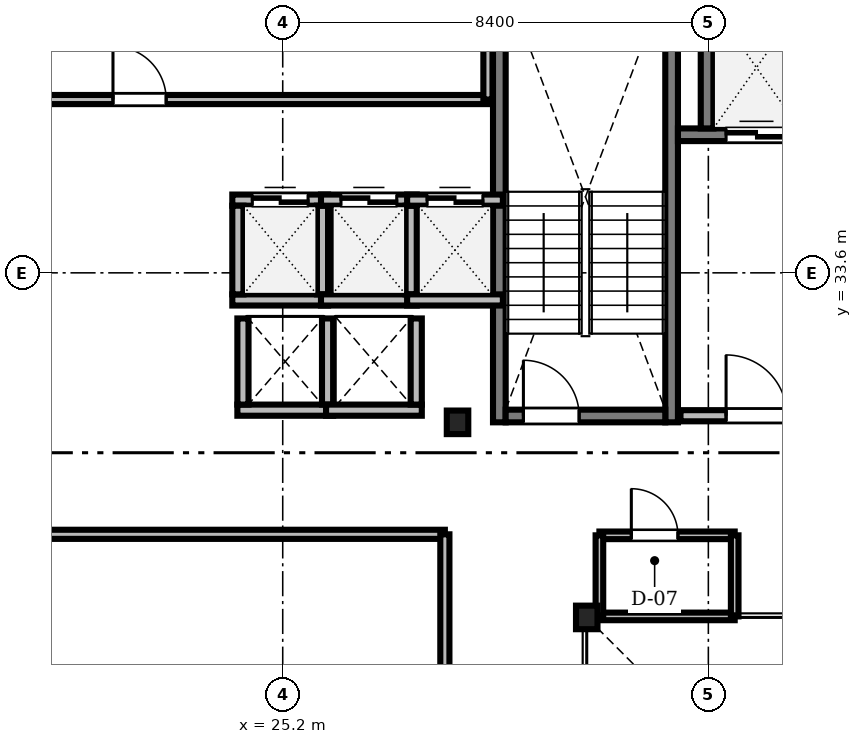
"""IFC4 building model, lengths in metres.
Left out: names, types, materials, properties, quantities, classifications, styles, units other than length and angle.
Written with IfcOpenShell. Run it as: python <this file> out.ifc"""

import sys

from ifc_helpers import new_model, si_unit, direction, frame, frame_2d, origin, origin_2d, place, context, subcontext, project, spatial, rectangle, i_section, extrude, source, transform, mapped, element, fill, save


model = new_model("IFC4")
c1 = context("Model", 3, precision=1e-05, world=origin(), true_north=direction((0.0, 1.0)))
c2 = subcontext(c1, "Body", "Model", "MODEL_VIEW")
j1 = project(units=[si_unit("LENGTHUNIT", "METRE"), si_unit("PLANEANGLEUNIT", "RADIAN")], contexts=[c1])
p1 = place(None, origin())
s1 = spatial("IfcSite", under=j1, at=p1, CompositionType="ELEMENT")
p2 = place(p1, origin())
s2 = spatial("IfcBuilding", under=s1, at=p2, CompositionType="ELEMENT")
p3 = place(p2, frame((0.0, 0.0, 155.7)))
s3 = spatial("IfcBuildingStorey", under=s2, at=p3, CompositionType="ELEMENT", Elevation=155.7)
m1 = source(origin(), c2, "Body", "SweptSolid", [
    extrude(i_section(OverallWidth=0.424, OverallDepth=0.465, WebThickness=0.035, FlangeThickness=0.056, FilletRadius=0.015, at=origin_2d()), origin(), (0.0, 0.0, 1.0), 3.46),
])
for number, where, z_axis, x_axis in (
    (1, (31.2, 26.8, 0.0), (0.0, 0.0, 1.0), (1.0, 0.0, 0.0)),
    (2, (28.65, 30.65, 0.0), (0.0, 0.0, 1.0), (1.0, 0.0, 0.0)),
):
    element("IfcColumn", number, at=place(p3, frame(where, z_axis=z_axis, x_axis=x_axis)), inside=s3, PredefinedType="COLUMN", context=c2, shape_type="MappedRepresentation", body=[
        mapped(m1, transform((0.0, 0.0, 0.0), scale=1.0)),
    ])
m2 = source(origin(), c2, "Body", "SweptSolid", [
    extrude(rectangle(XDim=9.25, YDim=0.25, at=frame_2d((4.625, 0.0))), origin(), (0.0, 0.0, 1.0), 3.5),
])
for number, where, z_axis, x_axis in (
    (3, (29.475, 30.65, 0.0), (0.0, 0.0, 1.0), (0.0, 1.0, 0.0)),
    (4, (32.875, 30.65, 0.0), (0.0, 0.0, 1.0), (0.0, 1.0, 0.0)),
):
    element("IfcWall", number, at=place(p3, frame(where, z_axis=z_axis, x_axis=x_axis)), inside=s3, PredefinedType="SOLIDWALL", context=c2, shape_type="MappedRepresentation", body=[
        mapped(m2, transform((0.0, 0.0, 0.0), scale=1.0)),
    ])
m3 = source(origin(), c2, "Body", "SweptSolid", [
    extrude(rectangle(XDim=3.15, YDim=0.25, at=frame_2d((1.575, 0.0))), origin(), (0.0, 0.0, 1.0), 3.5),
])
p4 = place(p3, frame((29.6, 30.775, 0.0), z_axis=(0.0, 0.0, 1.0), x_axis=(1.0, 0.0, 0.0)))
e5 = element("IfcWall", 5, at=p4, inside=s3, PredefinedType="SOLIDWALL", context=c2, shape_type="MappedRepresentation", body=[
    mapped(m3, transform((0.0, 0.0, 0.0), scale=1.0)),
])
m4 = source(origin(), c2, "Body", "SweptSolid", [
    extrude(rectangle(XDim=1.1, YDim=2.2, at=frame_2d((0.55, 1.1))), frame((0.0, 0.135, 0.0), z_axis=(0.0, -1.0, 0.0), x_axis=(1.0, 0.0, 0.0)), (0.0, 0.0, 1.0), 0.27),
])
p5 = place(p4, frame((0.35, 0.0, 0.0)))
e6 = element("IfcOpeningElement", 6, at=p5, cuts=e5, PredefinedType="OPENING", context=c2, shape_type="MappedRepresentation", body=[
    mapped(m4, transform((0.0, 0.0, 0.0), scale=1.0)),
])
m5 = source(origin(), c2, "Body", "SweptSolid", [
    extrude(rectangle(XDim=3.0, YDim=0.22, at=frame_2d((1.5, 0.0))), origin(), (0.0, 0.0, 1.0), 3.46),
])
p6 = place(p3, frame((33.05, 30.78, 0.0), z_axis=(0.0, 0.0, 1.0), x_axis=(1.0, 0.0, 0.0)))
e7 = element("IfcWall", 7, at=p6, inside=s3, PredefinedType="SOLIDWALL", context=c2, shape_type="MappedRepresentation", body=[
    mapped(m5, transform((0.0, 0.0, 0.0), scale=1.0)),
])
m6 = source(origin(), c2, "Body", "SweptSolid", [
    extrude(rectangle(XDim=1.2, YDim=2.2, at=frame_2d((0.6, 1.1))), frame((0.0, 0.12, 0.0), z_axis=(0.0, -1.0, 0.0), x_axis=(1.0, 0.0, 0.0)), (0.0, 0.0, 1.0), 0.24),
])
p7 = place(p6, frame((0.9, 0.0, 0.0)))
e8 = element("IfcOpeningElement", 8, at=p7, cuts=e7, PredefinedType="OPENING", context=c2, shape_type="MappedRepresentation", body=[
    mapped(m6, transform((0.0, 0.0, 0.0), scale=1.0)),
])
m7 = source(origin(), c2, "Body", "SweptSolid", [
    extrude(rectangle(XDim=1.89, YDim=0.22, at=frame_2d((0.945, 0.0))), origin(), (0.0, 0.0, 1.0), 3.46),
])
p8 = place(p3, frame((24.205, 33.065, 0.0), z_axis=(0.0, 0.0, 1.0), x_axis=(1.0, 0.0, 0.0)))
e9 = element("IfcWall", 9, at=p8, inside=s3, PredefinedType="SOLIDWALL", context=c2, shape_type="MappedRepresentation", body=[
    mapped(m7, transform((0.0, 0.0, 0.0), scale=1.0)),
])
p9 = place(p3, frame((24.205, 35.035, 0.0), z_axis=(0.0, 0.0, 1.0), x_axis=(1.0, 0.0, 0.0)))
e10 = element("IfcWall", 10, at=p9, inside=s3, PredefinedType="SOLIDWALL", context=c2, shape_type="MappedRepresentation", body=[
    mapped(m7, transform((0.0, 0.0, 0.0), scale=1.0)),
])
m8 = source(origin(), c2, "Body", "SweptSolid", [
    extrude(rectangle(XDim=1.1, YDim=2.2, at=frame_2d((0.55, 1.1))), frame((0.0, 0.12, 0.0), z_axis=(0.0, -1.0, 0.0), x_axis=(1.0, 0.0, 0.0)), (0.0, 0.0, 1.0), 0.24),
])
p10 = place(p9, frame((0.395, 0.0, 0.0)))
e11 = element("IfcOpeningElement", 11, at=p10, cuts=e10, PredefinedType="OPENING", context=c2, shape_type="MappedRepresentation", body=[
    mapped(m8, transform((0.0, 0.0, 0.0), scale=1.0)),
])
m9 = source(origin(), c2, "Body", "SweptSolid", [
    extrude(rectangle(XDim=1.75, YDim=0.22, at=frame_2d((0.875, 0.0))), origin(), (0.0, 0.0, 1.0), 3.46),
])
for number, where, z_axis, x_axis in (
    (12, (24.315, 33.175, 0.0), (0.0, 0.0, 1.0), (0.0, 1.0, 0.0)),
    (13, (25.985, 33.175, 0.0), (0.0, 0.0, 1.0), (0.0, 1.0, 0.0)),
):
    element("IfcWall", number, at=place(p3, frame(where, z_axis=z_axis, x_axis=x_axis)), inside=s3, PredefinedType="SOLIDWALL", context=c2, shape_type="MappedRepresentation", body=[
        mapped(m9, transform((0.0, 0.0, 0.0), scale=1.0)),
    ])
p11 = place(p3, frame((25.955, 33.065, 0.0), z_axis=(0.0, 0.0, 1.0), x_axis=(1.0, 0.0, 0.0)))
e14 = element("IfcWall", 14, at=p11, inside=s3, PredefinedType="SOLIDWALL", context=c2, shape_type="MappedRepresentation", body=[
    mapped(m7, transform((0.0, 0.0, 0.0), scale=1.0)),
])
p12 = place(p3, frame((25.955, 35.035, 0.0), z_axis=(0.0, 0.0, 1.0), x_axis=(1.0, 0.0, 0.0)))
e15 = element("IfcWall", 15, at=p12, inside=s3, PredefinedType="SOLIDWALL", context=c2, shape_type="MappedRepresentation", body=[
    mapped(m7, transform((0.0, 0.0, 0.0), scale=1.0)),
])
p13 = place(p12, frame((0.395, 0.0, 0.0)))
e16 = element("IfcOpeningElement", 16, at=p13, cuts=e15, PredefinedType="OPENING", context=c2, shape_type="MappedRepresentation", body=[
    mapped(m8, transform((0.0, 0.0, 0.0), scale=1.0)),
])
p14 = place(p3, frame((27.735, 33.175, 0.0), z_axis=(0.0, 0.0, 1.0), x_axis=(0.0, 1.0, 0.0)))
e17 = element("IfcWall", 17, at=p14, inside=s3, PredefinedType="SOLIDWALL", context=c2, shape_type="MappedRepresentation", body=[
    mapped(m9, transform((0.0, 0.0, 0.0), scale=1.0)),
])
p15 = place(p3, frame((27.655, 33.065, 0.0), z_axis=(0.0, 0.0, 1.0), x_axis=(1.0, 0.0, 0.0)))
e18 = element("IfcWall", 18, at=p15, inside=s3, PredefinedType="SOLIDWALL", context=c2, shape_type="MappedRepresentation", body=[
    mapped(m7, transform((0.0, 0.0, 0.0), scale=1.0)),
])
p16 = place(p3, frame((27.655, 35.035, 0.0), z_axis=(0.0, 0.0, 1.0), x_axis=(1.0, 0.0, 0.0)))
e19 = element("IfcWall", 19, at=p16, inside=s3, PredefinedType="SOLIDWALL", context=c2, shape_type="MappedRepresentation", body=[
    mapped(m7, transform((0.0, 0.0, 0.0), scale=1.0)),
])
p17 = place(p16, frame((0.395, 0.0, 0.0)))
e20 = element("IfcOpeningElement", 20, at=p17, cuts=e19, PredefinedType="OPENING", context=c2, shape_type="MappedRepresentation", body=[
    mapped(m8, transform((0.0, 0.0, 0.0), scale=1.0)),
])
m10 = source(origin(), c2, "Body", "SweptSolid", [
    extrude(rectangle(XDim=3.1, YDim=0.25, at=frame_2d((1.55, 0.0))), origin(), (0.0, 0.0, 1.0), 3.46),
])
p18 = place(p3, frame((33.0, 36.325, 0.0), z_axis=(0.0, 0.0, 1.0), x_axis=(1.0, 0.0, 0.0)))
e21 = element("IfcWall", 21, at=p18, inside=s3, PredefinedType="SOLIDWALL", context=c2, shape_type="MappedRepresentation", body=[
    mapped(m10, transform((0.0, 0.0, 0.0), scale=1.0)),
])
m11 = source(origin(), c2, "Body", "SweptSolid", [
    extrude(rectangle(XDim=1.2, YDim=2.25, at=frame_2d((0.6, 1.125))), frame((0.0, 0.135, 0.0), z_axis=(0.0, -1.0, 0.0), x_axis=(1.0, 0.0, 0.0)), (0.0, 0.0, 1.0), 0.27),
])
p19 = place(p18, frame((0.95, 0.0, 0.0)))
e22 = element("IfcOpeningElement", 22, at=p19, cuts=e21, PredefinedType="OPENING", context=c2, shape_type="MappedRepresentation", body=[
    mapped(m11, transform((0.0, 0.0, 0.0), scale=1.0)),
])
m12 = source(origin(), c2, "Body", "SweptSolid", [
    extrude(rectangle(XDim=2.4, YDim=0.25, at=frame_2d((1.2, 0.0))), origin(), (0.0, 0.0, 1.0), 3.46),
])
p20 = place(p3, frame((33.575, 36.45, 0.0), z_axis=(0.0, 0.0, 1.0), x_axis=(0.0, 1.0, 0.0)))
e23 = element("IfcWall", 23, at=p20, inside=s3, PredefinedType="SOLIDWALL", context=c2, shape_type="MappedRepresentation", body=[
    mapped(m12, transform((0.0, 0.0, 0.0), scale=1.0)),
])
m13 = source(origin(), c2, "Body", "SweptSolid", [
    extrude(rectangle(XDim=1.89, YDim=0.22, at=frame_2d((0.945, 0.0))), origin(), (0.0, 0.0, 1.0), 3.46),
])
p21 = place(p3, frame((24.305, 30.89, 0.0), z_axis=(0.0, 0.0, 1.0), x_axis=(1.0, 0.0, 0.0)))
e24 = element("IfcWall", 24, at=p21, inside=s3, PredefinedType="SOLIDWALL", context=c2, shape_type="MappedRepresentation", body=[
    mapped(m13, transform((0.0, 0.0, 0.0), scale=1.0)),
])
m14 = source(origin(), c2, "Body", "SweptSolid", [
    extrude(rectangle(XDim=1.7, YDim=0.22, at=frame_2d((0.85, 0.0))), origin(), (0.0, 0.0, 1.0), 3.46),
])
for number, where, z_axis, x_axis in (
    (25, (24.415, 31.0, 0.0), (0.0, 0.0, 1.0), (0.0, 1.0, 0.0)),
    (26, (26.085, 31.0, 0.0), (0.0, 0.0, 1.0), (0.0, 1.0, 0.0)),
):
    element("IfcWall", number, at=place(p3, frame(where, z_axis=z_axis, x_axis=x_axis)), inside=s3, PredefinedType="SOLIDWALL", context=c2, shape_type="MappedRepresentation", body=[
        mapped(m14, transform((0.0, 0.0, 0.0), scale=1.0)),
    ])
p22 = place(p3, frame((26.055, 30.89, 0.0), z_axis=(0.0, 0.0, 1.0), x_axis=(1.0, 0.0, 0.0)))
e27 = element("IfcWall", 27, at=p22, inside=s3, PredefinedType="SOLIDWALL", context=c2, shape_type="MappedRepresentation", body=[
    mapped(m13, transform((0.0, 0.0, 0.0), scale=1.0)),
])
p23 = place(p3, frame((27.835, 31.0, 0.0), z_axis=(0.0, 0.0, 1.0), x_axis=(0.0, 1.0, 0.0)))
e28 = element("IfcWall", 28, at=p23, inside=s3, PredefinedType="SOLIDWALL", context=c2, shape_type="MappedRepresentation", body=[
    mapped(m14, transform((0.0, 0.0, 0.0), scale=1.0)),
])
m15 = source(origin(), c2, "Body", "SweptSolid", [
    extrude(rectangle(XDim=22.328, YDim=0.18, at=frame_2d((11.164, 0.0))), origin(), (0.0, 0.0, 1.0), 2.702),
])
p24 = place(p3, frame((6.922, 37.02, 0.0), z_axis=(0.0, 0.0, 1.0), x_axis=(1.0, 0.0, 0.0)))
e29 = element("IfcWall", 29, at=p24, inside=s3, PredefinedType="PARTITIONING", context=c2, shape_type="MappedRepresentation", body=[
    mapped(m15, transform((0.0, 0.0, 0.0), scale=1.0)),
])
m16 = source(origin(), c2, "Body", "SweptSolid", [
    extrude(rectangle(XDim=1.05, YDim=2.2, at=frame_2d((0.525, 1.1))), frame((0.0, 0.1, 0.0), z_axis=(0.0, -1.0, 0.0), x_axis=(1.0, 0.0, 0.0)), (0.0, 0.0, 1.0), 0.2),
])
p25 = place(p24, frame((14.928, 0.0, 0.0)))
e30 = element("IfcOpeningElement", 30, at=p25, cuts=e29, PredefinedType="OPENING", context=c2, shape_type="MappedRepresentation", body=[
    mapped(m16, transform((0.0, 0.0, 0.0), scale=1.0)),
])
m17 = source(origin(), c2, "Body", "SweptSolid", [
    extrude(rectangle(XDim=2.67, YDim=0.15, at=frame_2d((1.335, 0.0))), origin(), (0.0, 0.0, 1.0), 3.092),
])
p26 = place(p3, frame((31.45, 28.42, 0.0), z_axis=(0.0, 0.0, 1.0), x_axis=(1.0, 0.0, 0.0)))
e31 = element("IfcWall", 31, at=p26, inside=s3, PredefinedType="PARTITIONING", context=c2, shape_type="MappedRepresentation", body=[
    mapped(m17, transform((0.0, 0.0, 0.0), scale=1.0)),
])
m18 = source(origin(), c2, "Body", "SweptSolid", [
    extrude(rectangle(XDim=0.92, YDim=2.1, at=frame_2d((0.46, 1.05))), frame((0.0, 0.085, 0.0), z_axis=(0.0, -1.0, 0.0), x_axis=(1.0, 0.0, 0.0)), (0.0, 0.0, 1.0), 0.17),
])
p27 = place(p26, frame((0.63, 0.0, 0.0)))
e32 = element("IfcOpeningElement", 32, at=p27, cuts=e31, PredefinedType="OPENING", context=c2, shape_type="MappedRepresentation", body=[
    mapped(m18, transform((0.0, 0.0, 0.0), scale=1.0)),
])
m19 = source(origin(), c2, "Body", "SweptSolid", [
    extrude(rectangle(XDim=11.45, YDim=0.18, at=frame_2d((5.725, 0.0))), origin(), (0.0, 0.0, 1.0), 2.702),
])
p28 = place(p3, frame((29.25, 37.02, 0.0), z_axis=(0.0, 0.0, 1.0), x_axis=(0.0, 1.0, 0.0)))
e33 = element("IfcWall", 33, at=p28, inside=s3, PredefinedType="PARTITIONING", context=c2, shape_type="MappedRepresentation", body=[
    mapped(m19, transform((0.0, 0.0, 0.0), scale=1.0)),
])
m20 = source(origin(), c2, "Body", "SweptSolid", [
    extrude(rectangle(XDim=9.38, YDim=0.18, at=frame_2d((4.69, 0.0))), origin(), (0.0, 0.0, 1.0), 3.46),
])
p29 = place(p3, frame((19.02, 28.44, 0.0), z_axis=(0.0, 0.0, 1.0), x_axis=(1.0, 0.0, 0.0)))
e34 = element("IfcWall", 34, at=p29, inside=s3, PredefinedType="PARTITIONING", context=c2, shape_type="MappedRepresentation", body=[
    mapped(m20, transform((0.0, 0.0, 0.0), scale=1.0)),
])
m21 = source(origin(), c2, "Body", "SweptSolid", [
    extrude(rectangle(XDim=6.54, YDim=0.18, at=frame_2d((3.27, 0.0))), origin(), (0.0, 0.0, 1.0), 2.852),
])
p30 = place(p3, frame((28.4, 21.9, 0.0), z_axis=(0.0, 0.0, 1.0), x_axis=(0.0, 1.0, 0.0)))
e35 = element("IfcWall", 35, at=p30, inside=s3, PredefinedType="PARTITIONING", context=c2, shape_type="MappedRepresentation", body=[
    mapped(m21, transform((0.0, 0.0, 0.0), scale=1.0)),
])
m22 = source(origin(), c2, "Body", "SweptSolid", [
    extrude(rectangle(XDim=2.67, YDim=0.15, at=frame_2d((1.335, 0.0))), origin(), (0.0, 0.0, 1.0), 3.002),
])
p31 = place(p3, frame((31.45, 26.82, 0.0), z_axis=(0.0, 0.0, 1.0), x_axis=(1.0, 0.0, 0.0)))
e36 = element("IfcWall", 36, at=p31, inside=s3, PredefinedType="PARTITIONING", context=c2, shape_type="MappedRepresentation", body=[
    mapped(m22, transform((0.0, 0.0, 0.0), scale=1.0)),
])
m23 = source(origin(), c2, "Body", "SweptSolid", [
    extrude(rectangle(XDim=1.6, YDim=0.15, at=frame_2d((0.8, 0.0))), origin(), (0.0, 0.0, 1.0), 3.002),
])
for number, where, z_axis, x_axis in (
    (37, (31.45, 26.82, 0.0), (0.0, 0.0, 1.0), (0.0, 1.0, 0.0)),
    (38, (34.12, 26.82, 0.0), (0.0, 0.0, 1.0), (0.0, 1.0, 0.0)),
):
    element("IfcWall", number, at=place(p3, frame(where, z_axis=z_axis, x_axis=x_axis)), inside=s3, PredefinedType="PARTITIONING", context=c2, shape_type="MappedRepresentation", body=[
        mapped(m23, transform((0.0, 0.0, 0.0), scale=1.0)),
    ])
m24 = source(origin(), c2, "Body", "SweptSolid", [
    extrude(rectangle(XDim=1.1, YDim=2.2, at=frame_2d((0.55, 1.1))), frame((0.0, 0.025, 0.0), z_axis=(0.0, -1.0, 0.0), x_axis=(1.0, 0.0, 0.0)), (0.0, 0.0, 1.0), 0.05),
])
p32 = place(p5, origin())
e39 = element("IfcDoor", 39, at=p32, inside=s3, OperationType="SINGLE_SWING_LEFT", PredefinedType="DOOR", context=c2, shape_type="MappedRepresentation", body=[
    mapped(m24, transform((0.0, 0.0, 0.0), scale=1.0)),
])
fill(e6, e39)
m25 = source(origin(), c2, "Body", "SweptSolid", [
    extrude(rectangle(XDim=1.2, YDim=2.2, at=frame_2d((0.6, 1.1))), frame((0.0, 0.025, 0.0), z_axis=(0.0, -1.0, 0.0), x_axis=(1.0, 0.0, 0.0)), (0.0, 0.0, 1.0), 0.05),
])
p33 = place(p7, origin())
e40 = element("IfcDoor", 40, at=p33, inside=s3, OperationType="SINGLE_SWING_LEFT", PredefinedType="DOOR", context=c2, shape_type="MappedRepresentation", body=[
    mapped(m25, transform((0.0, 0.0, 0.0), scale=1.0)),
])
fill(e8, e40)
p34 = place(p10, origin())
e41 = element("IfcDoor", 41, at=p34, inside=s3, OperationType="DOUBLE_DOOR_SLIDING", PredefinedType="DOOR", context=c2, shape_type="MappedRepresentation", body=[
    mapped(m24, transform((0.0, 0.0, 0.0), scale=1.0)),
])
fill(e11, e41)
p35 = place(p13, origin())
e42 = element("IfcDoor", 42, at=p35, inside=s3, OperationType="DOUBLE_DOOR_SLIDING", PredefinedType="DOOR", context=c2, shape_type="MappedRepresentation", body=[
    mapped(m24, transform((0.0, 0.0, 0.0), scale=1.0)),
])
fill(e16, e42)
p36 = place(p17, origin())
e43 = element("IfcDoor", 43, at=p36, inside=s3, OperationType="DOUBLE_DOOR_SLIDING", PredefinedType="DOOR", context=c2, shape_type="MappedRepresentation", body=[
    mapped(m24, transform((0.0, 0.0, 0.0), scale=1.0)),
])
fill(e20, e43)
m26 = source(origin(), c2, "Body", "SweptSolid", [
    extrude(rectangle(XDim=1.2, YDim=2.25, at=frame_2d((0.6, 1.125))), frame((0.0, 0.025, 0.0), z_axis=(0.0, -1.0, 0.0), x_axis=(1.0, 0.0, 0.0)), (0.0, 0.0, 1.0), 0.05),
])
p37 = place(p19, origin())
e44 = element("IfcDoor", 44, at=p37, inside=s3, OperationType="DOUBLE_DOOR_SLIDING", PredefinedType="DOOR", context=c2, shape_type="MappedRepresentation", body=[
    mapped(m26, transform((0.0, 0.0, 0.0), scale=1.0)),
])
fill(e22, e44)
m27 = source(origin(), c2, "Body", "SweptSolid", [
    extrude(rectangle(XDim=1.05, YDim=2.2, at=frame_2d((0.525, 1.1))), frame((0.0, 0.025, 0.0), z_axis=(0.0, -1.0, 0.0), x_axis=(1.0, 0.0, 0.0)), (0.0, 0.0, 1.0), 0.05),
])
p38 = place(p25, origin())
e45 = element("IfcDoor", 45, at=p38, inside=s3, OperationType="SINGLE_SWING_LEFT", PredefinedType="DOOR", context=c2, shape_type="MappedRepresentation", body=[
    mapped(m27, transform((0.0, 0.0, 0.0), scale=1.0)),
])
fill(e30, e45)
m28 = source(origin(), c2, "Body", "SweptSolid", [
    extrude(rectangle(XDim=0.92, YDim=2.1, at=frame_2d((0.46, 1.05))), frame((0.0, 0.025, 0.0), z_axis=(0.0, -1.0, 0.0), x_axis=(1.0, 0.0, 0.0)), (0.0, 0.0, 1.0), 0.05),
])
p39 = place(p27, origin())
e46 = element("IfcDoor", 46, at=p39, inside=s3, OperationType="SINGLE_SWING_LEFT", PredefinedType="DOOR", context=c2, shape_type="MappedRepresentation", body=[
    mapped(m28, transform((0.0, 0.0, 0.0), scale=1.0)),
])
fill(e32, e46)
save(model, sys.argv[1])
